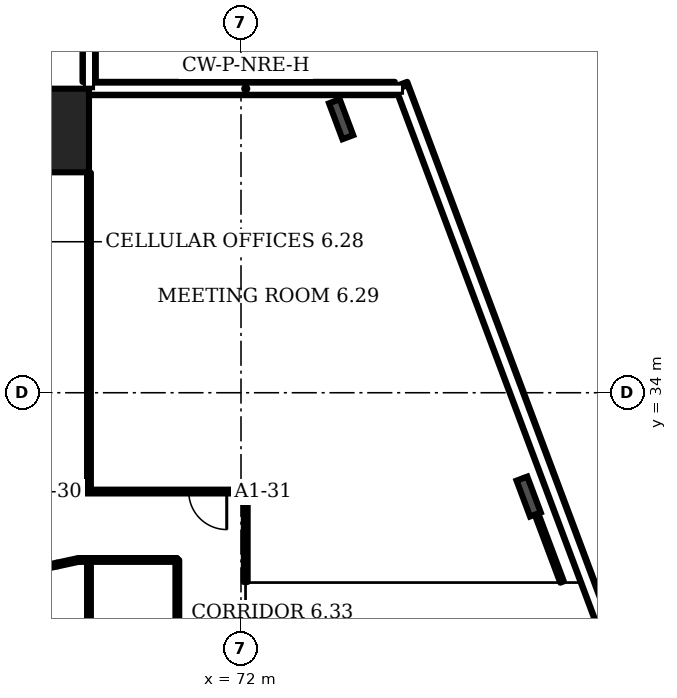
"""IFC4 building model, lengths in metres.
Left out: names, types, materials, properties, quantities, classifications, styles, units other than length and angle.
Written with IfcOpenShell. Run it as: python <this file> out.ifc"""

import sys

from ifc_helpers import new_model, si_unit, direction, frame, frame_2d, origin, origin_2d, place, context, subcontext, project, spatial, rectangle, i_section, extrude, element, fill, save


model = new_model("IFC4")
c1 = context("Model", 3, precision=1e-05, world=origin(), true_north=direction((0.0, 1.0)))
c2 = subcontext(c1, "Body", "Model", "MODEL_VIEW")
j1 = project(units=[si_unit("LENGTHUNIT", "METRE"), si_unit("PLANEANGLEUNIT", "RADIAN")], contexts=[c1])
p1 = place(None, origin())
s1 = spatial("IfcSite", under=j1, at=p1, CompositionType="ELEMENT")
p2 = place(p1, origin())
s2 = spatial("IfcBuilding", under=s1, at=p2, CompositionType="ELEMENT")
p3 = place(p2, frame((0.0, 0.0, 41.5)))
s3 = spatial("IfcBuildingStorey", under=s2, at=p3, CompositionType="ELEMENT", Elevation=41.5)
p4 = place(p3, frame((66.9, 40.9, 0.0), z_axis=(0.0, 0.0, 1.0), x_axis=(1.0, 0.0, 0.0)))
e1 = element("IfcColumn", 1, at=p4, inside=s3, PredefinedType="COLUMN", context=c2, shape_type="SweptSolid", body=[
    extrude(rectangle(XDim=2.2, YDim=2.2, at=origin_2d()), origin(), (0.0, 0.0, 1.0), 3.6),
])
for number, where, z_axis, x_axis in (
    (2, (79.57, 31.268, 0.0), (0.0, 0.0, 1.0), (0.936, 0.351, 0.0)),
    (3, (74.634, 41.196, 0.0), (0.0, 0.0, 1.0), (0.936, 0.351, 0.0)),
):
    element("IfcColumn", number, at=place(p3, frame(where, z_axis=z_axis, x_axis=x_axis)), inside=s3, PredefinedType="COLUMN", context=c2, shape_type="SweptSolid", body=[
        extrude(i_section(OverallWidth=0.302, OverallDepth=1.008, WebThickness=0.021, FlangeThickness=0.04, FilletRadius=0.03, at=origin_2d()), origin(), (0.0, 0.0, 1.0), 3.6),
    ])
p5 = place(p3, frame((91.926, 0.211, 0.0), z_axis=(0.0, 0.0, 1.0), x_axis=(-0.351119, 0.93633, 0.0)))
e4 = element("IfcWall", 4, at=p5, inside=s3, PredefinedType="SOLIDWALL", context=c2, shape_type="SweptSolid", body=[
    extrude(rectangle(XDim=44.757, YDim=0.35, at=frame_2d((22.378, 0.0))), origin(), (0.0, 0.0, 1.0), 1.0),
])
p6 = place(p3, frame((76.047, 42.005, 0.0), z_axis=(0.0, 0.0, 1.0), x_axis=(-1.0, 0.0, 0.0)))
e5 = element("IfcWall", 5, at=p6, inside=s3, PredefinedType="SOLIDWALL", context=c2, shape_type="SweptSolid", body=[
    extrude(rectangle(XDim=8.047, YDim=0.35, at=frame_2d((4.023, 0.0))), origin(), (0.0, 0.0, 1.0), 1.0),
])
p7 = place(p3, frame((68.005, 42.18, 0.0), z_axis=(0.0, 0.0, 1.0), x_axis=(0.0, 1.0, 0.0)))
e6 = element("IfcWall", 6, at=p7, inside=s3, PredefinedType="SOLIDWALL", context=c2, shape_type="SweptSolid", body=[
    extrude(rectangle(XDim=5.947, YDim=0.35, at=frame_2d((2.973, 0.0))), origin(), (0.0, 0.0, 1.0), 1.0),
])
p8 = place(p3, frame((65.0, 31.4, 0.0), z_axis=(0.0, 0.0, 1.0), x_axis=(1.0, 0.0, 0.0)))
e7 = element("IfcWall", 7, at=p8, inside=s3, PredefinedType="PARTITIONING", context=c2, shape_type="SweptSolid", body=[
    extrude(rectangle(XDim=7.125, YDim=0.1, at=frame_2d((3.562, 0.0))), origin(), (0.0, 0.0, 1.0), 3.2),
])
p9 = place(p8, frame((0.1, 0.0, 0.0)))
e8 = element("IfcOpeningElement", 8, at=p9, cuts=e7, PredefinedType="OPENING", context=c2, shape_type="SweptSolid", body=[
    extrude(rectangle(XDim=1.0, YDim=2.1, at=frame_2d((0.5, 1.05))), frame((0.0, 0.06, 0.0), z_axis=(0.0, -1.0, 0.0), x_axis=(1.0, 0.0, 0.0)), (0.0, 0.0, 1.0), 0.12),
])
p10 = place(p8, frame((5.625, 0.0, 0.0)))
e9 = element("IfcOpeningElement", 9, at=p10, cuts=e7, PredefinedType="OPENING", context=c2, shape_type="SweptSolid", body=[
    extrude(rectangle(XDim=1.0, YDim=2.1, at=frame_2d((0.5, 1.05))), frame((0.0, 0.06, 0.0), z_axis=(0.0, -1.0, 0.0), x_axis=(1.0, 0.0, 0.0)), (0.0, 0.0, 1.0), 0.12),
])
p11 = place(p3, frame((66.78, 29.4, 0.0), z_axis=(0.0, 0.0, 1.0), x_axis=(0.979048, 0.203632, 0.0)))
e10 = element("IfcWall", 10, at=p11, inside=s3, PredefinedType="PARTITIONING", context=c2, shape_type="SweptSolid", body=[
    extrude(rectangle(XDim=0.393, YDim=0.1, at=frame_2d((0.197, 0.0))), origin(), (0.0, 0.0, 1.0), 3.2),
])
p12 = place(p3, frame((67.165, 29.48, 0.0), z_axis=(0.0, 0.0, 1.0), x_axis=(0.977367, 0.211555, 0.0)))
e11 = element("IfcWall", 11, at=p12, inside=s3, PredefinedType="PARTITIONING", context=c2, shape_type="SweptSolid", body=[
    extrude(rectangle(XDim=0.568, YDim=0.1, at=frame_2d((0.284, 0.0))), origin(), (0.0, 0.0, 1.0), 3.2),
])
p13 = place(p3, frame((67.72, 29.6, 0.0), z_axis=(0.0, 0.0, 1.0), x_axis=(1.0, 0.0, 0.0)))
e12 = element("IfcWall", 12, at=p13, inside=s3, PredefinedType="PARTITIONING", context=c2, shape_type="SweptSolid", body=[
    extrude(rectangle(XDim=2.605, YDim=0.1, at=frame_2d((1.302, 0.0))), origin(), (0.0, 0.0, 1.0), 3.2),
])
p14 = place(p3, frame((68.0, 14.24, 0.0), z_axis=(0.0, 0.0, 1.0), x_axis=(0.0, 1.0, 0.0)))
e13 = element("IfcWall", 13, at=p14, inside=s3, PredefinedType="PARTITIONING", context=c2, shape_type="SweptSolid", body=[
    extrude(rectangle(XDim=15.36, YDim=0.1, at=frame_2d((7.68, 0.0))), origin(), (0.0, 0.0, 1.0), 3.2),
])
p15 = place(p3, frame((68.0, 31.4, 0.0), z_axis=(0.0, 0.0, 1.0), x_axis=(0.0, 1.0, 0.0)))
e14 = element("IfcWall", 14, at=p15, inside=s3, PredefinedType="PARTITIONING", context=c2, shape_type="SweptSolid", body=[
    extrude(rectangle(XDim=8.39, YDim=0.1, at=frame_2d((4.195, 0.0))), origin(), (0.0, 0.0, 1.0), 3.2),
])
p16 = place(p3, frame((70.325, 24.6, 0.0), z_axis=(0.0, 0.0, 1.0), x_axis=(0.0, 1.0, 0.0)))
e15 = element("IfcWall", 15, at=p16, inside=s3, PredefinedType="PARTITIONING", context=c2, shape_type="SweptSolid", body=[
    extrude(rectangle(XDim=5.0, YDim=0.1, at=frame_2d((2.5, 0.0))), origin(), (0.0, 0.0, 1.0), 3.2),
])
p17 = place(p3, frame((72.125, 29.02, 0.0), z_axis=(0.0, 0.0, 1.0), x_axis=(0.0, 1.0, 0.0)))
e16 = element("IfcWall", 16, at=p17, inside=s3, PredefinedType="PARTITIONING", context=c2, shape_type="SweptSolid", body=[
    extrude(rectangle(XDim=2.38, YDim=0.1, at=frame_2d((1.19, 0.0))), origin(), (0.0, 0.0, 1.0), 3.2),
])
p18 = place(p3, frame((80.448, 29.02, 0.0), z_axis=(0.0, 0.0, 1.0), x_axis=(-0.35129, 0.93627, 0.0)))
e17 = element("IfcWall", 17, at=p18, inside=s3, PredefinedType="PARTITIONING", context=c2, shape_type="SweptSolid", body=[
    extrude(rectangle(XDim=2.911, YDim=0.1, at=frame_2d((1.455, 0.0))), origin(), (0.0, 0.0, 1.0), 2.58),
])
p19 = place(p10, origin())
e18 = element("IfcDoor", 18, at=p19, inside=s3, OperationType="SINGLE_SWING_RIGHT", PredefinedType="DOOR", context=c2, shape_type="SweptSolid", body=[
    extrude(rectangle(XDim=1.0, YDim=2.1, at=frame_2d((0.5, 1.05))), frame((0.0, 0.025, 0.0), z_axis=(0.0, -1.0, 0.0), x_axis=(1.0, 0.0, 0.0)), (0.0, 0.0, 1.0), 0.05),
])
fill(e9, e18)
save(model, sys.argv[1])
